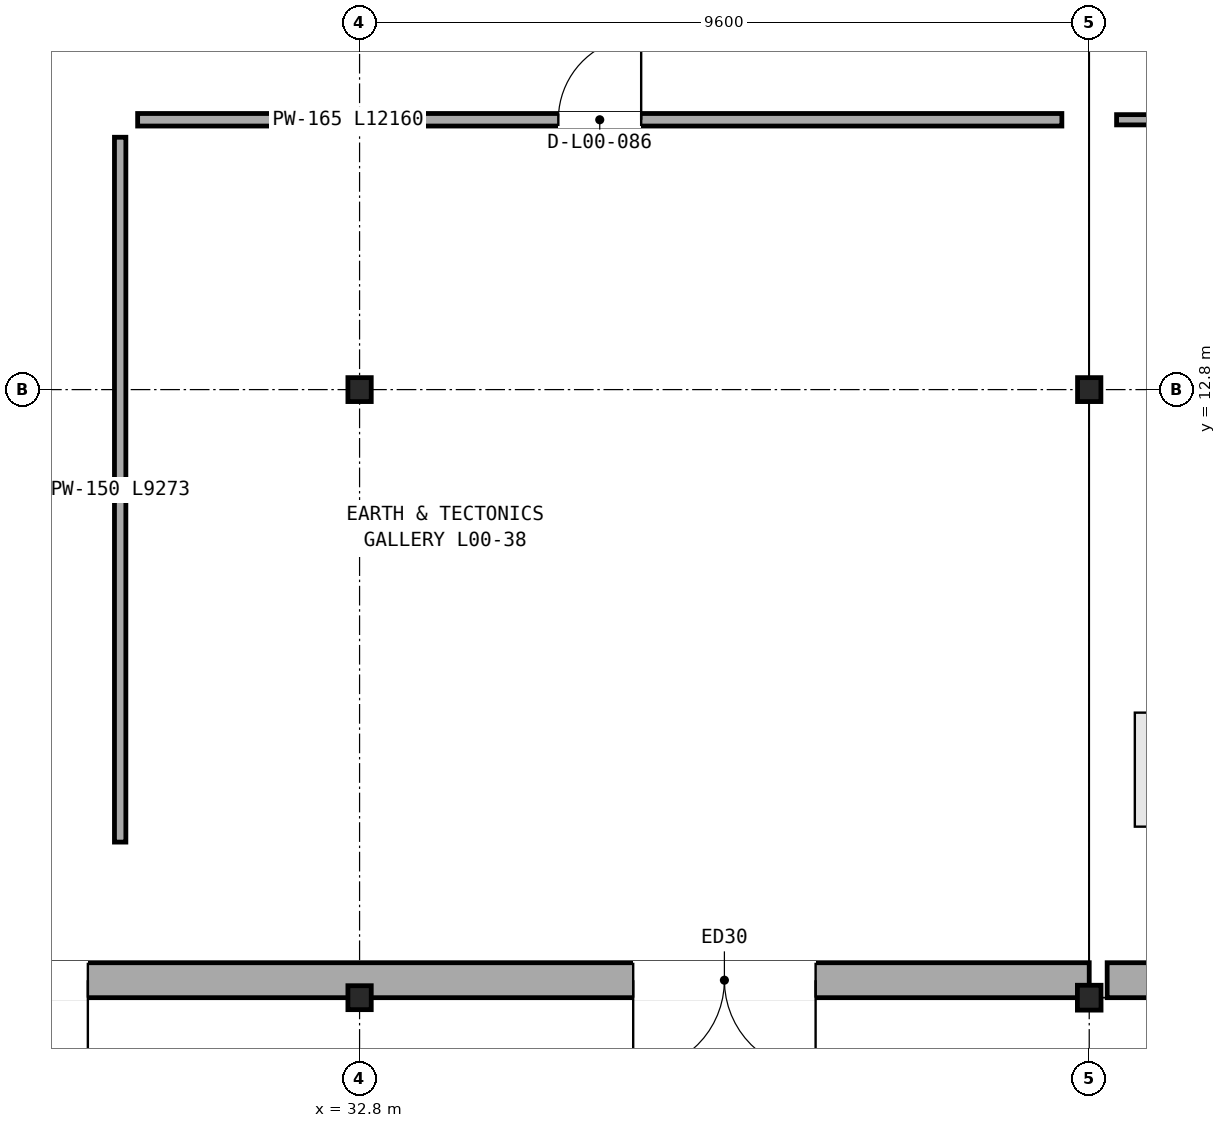
"""IFC4 building model, lengths in metres.
Left out: names, types, materials, properties, quantities, classifications, styles, units other than length and angle.
Written with IfcOpenShell. Run it as: python <this file> out.ifc"""

import sys

from ifc_helpers import new_model, si_unit, direction, frame, frame_2d, origin, origin_2d, place, context, subcontext, project, spatial, rectangle, i_section, extrude, element, fill, save


model = new_model("IFC4")
c1 = context("Model", 3, precision=1e-05, world=origin(), true_north=direction((0.0, 1.0)))
c2 = subcontext(c1, "Body", "Model", "MODEL_VIEW")
j1 = project(units=[si_unit("LENGTHUNIT", "METRE"), si_unit("PLANEANGLEUNIT", "RADIAN")], contexts=[c1])
p1 = place(None, origin())
s1 = spatial("IfcSite", under=j1, at=p1, CompositionType="ELEMENT")
p2 = place(p1, origin())
s2 = spatial("IfcBuilding", under=s1, at=p2, CompositionType="ELEMENT")
p3 = place(p2, origin())
s3 = spatial("IfcBuildingStorey", under=s2, at=p3, CompositionType="ELEMENT", Elevation=0.0)
for number, where, z_axis, x_axis in (
    (1, (32.8, 4.8, 0.0), (0.0, 0.0, 1.0), (1.0, 0.0, 0.0)),
    (2, (32.8, 12.8, 0.0), (0.0, 0.0, 1.0), (1.0, 0.0, 0.0)),
):
    element("IfcColumn", number, at=place(p3, frame(where, z_axis=z_axis, x_axis=x_axis)), inside=s3, PredefinedType="COLUMN", context=c2, shape_type="SweptSolid", body=[
        extrude(i_section(OverallWidth=0.307, OverallDepth=0.315, WebThickness=0.012, FlangeThickness=0.019, FilletRadius=0.017, at=origin_2d()), origin(), (0.0, 0.0, 1.0), 5.6),
    ])
p4 = place(p3, frame((42.4, 4.8, 0.0), z_axis=(0.0, 0.0, 1.0), x_axis=(1.0, 0.0, 0.0)))
e3 = element("IfcColumn", 3, at=p4, inside=s3, PredefinedType="COLUMN", context=c2, shape_type="SweptSolid", body=[
    extrude(i_section(OverallWidth=0.311, OverallDepth=0.327, WebThickness=0.016, FlangeThickness=0.025, FilletRadius=0.017, at=origin_2d()), origin(), (0.0, 0.0, 1.0), 5.6),
])
p5 = place(p3, frame((42.4, 12.8, 0.0), z_axis=(0.0, 0.0, 1.0), x_axis=(1.0, 0.0, 0.0)))
e4 = element("IfcColumn", 4, at=p5, inside=s3, PredefinedType="COLUMN", context=c2, shape_type="SweptSolid", body=[
    extrude(i_section(OverallWidth=0.307, OverallDepth=0.315, WebThickness=0.012, FlangeThickness=0.019, FilletRadius=0.017, at=origin_2d()), origin(), (0.0, 0.0, 1.0), 5.6),
])
p6 = place(p3, frame((5.036, 5.03, 0.0), z_axis=(0.0, 0.0, 1.0), x_axis=(1.0, 0.0, 0.0)))
e5 = element("IfcWall", 5, at=p6, inside=s3, PredefinedType="SOLIDWALL", context=c2, shape_type="SweptSolid", body=[
    extrude(rectangle(XDim=37.364, YDim=0.46, at=frame_2d((18.682, 0.0))), origin(), (0.0, 0.0, 1.0), 4.802),
])
p7 = place(p6, frame((12.114, 0.0, 0.0)))
e6 = element("IfcOpeningElement", 6, at=p7, cuts=e5, PredefinedType="OPENING", context=c2, shape_type="SweptSolid", body=[
    extrude(rectangle(XDim=2.5, YDim=2.55, at=frame_2d((1.25, 1.275))), frame((0.0, 0.24, 0.0), z_axis=(0.0, -1.0, 0.0), x_axis=(1.0, 0.0, 0.0)), (0.0, 0.0, 1.0), 0.48),
])
p8 = place(p6, frame((21.739, 0.0, 0.0)))
e7 = element("IfcOpeningElement", 7, at=p8, cuts=e5, PredefinedType="OPENING", context=c2, shape_type="SweptSolid", body=[
    extrude(rectangle(XDim=2.45, YDim=2.5, at=frame_2d((1.225, 1.25))), frame((0.0, 0.24, 0.0), z_axis=(0.0, -1.0, 0.0), x_axis=(1.0, 0.0, 0.0)), (0.0, 0.0, 1.0), 0.48),
])
p9 = place(p6, frame((31.364, 0.0, 0.0)))
e8 = element("IfcOpeningElement", 8, at=p9, cuts=e5, PredefinedType="OPENING", context=c2, shape_type="SweptSolid", body=[
    extrude(rectangle(XDim=2.4, YDim=2.45, at=frame_2d((1.2, 1.225))), frame((0.0, 0.24, 0.0), z_axis=(0.0, -1.0, 0.0), x_axis=(1.0, 0.0, 0.0)), (0.0, 0.0, 1.0), 0.48),
])
p10 = place(p6, frame((1.8, 0.0, 0.9)))
e9 = element("IfcOpeningElement", 9, at=p10, cuts=e5, PredefinedType="OPENING", context=c2, shape_type="SweptSolid", body=[
    extrude(rectangle(XDim=1.85, YDim=1.85, at=frame_2d((0.925, 0.925))), frame((0.0, 0.24, 0.0), z_axis=(0.0, -1.0, 0.0), x_axis=(1.0, 0.0, 0.0)), (0.0, 0.0, 1.0), 0.48),
])
p11 = place(p3, frame((42.636, 5.03, 0.0), z_axis=(0.0, 0.0, 1.0), x_axis=(1.0, 0.0, 0.0)))
e10 = element("IfcWall", 10, at=p11, inside=s3, PredefinedType="SOLIDWALL", context=c2, shape_type="SweptSolid", body=[
    extrude(rectangle(XDim=37.928, YDim=0.46, at=frame_2d((18.964, 0.0))), origin(), (0.0, 0.0, 1.0), 4.802),
])
p12 = place(p11, frame((29.614, 0.0, 0.0)))
e11 = element("IfcOpeningElement", 11, at=p12, cuts=e10, PredefinedType="OPENING", context=c2, shape_type="SweptSolid", body=[
    extrude(rectangle(XDim=2.4, YDim=2.45, at=frame_2d((1.2, 1.225))), frame((0.0, 0.24, 0.0), z_axis=(0.0, -1.0, 0.0), x_axis=(1.0, 0.0, 0.0)), (0.0, 0.0, 1.0), 0.48),
])
p13 = place(p11, frame((1.8, 0.0, 0.9)))
e12 = element("IfcOpeningElement", 12, at=p13, cuts=e10, PredefinedType="OPENING", context=c2, shape_type="SweptSolid", body=[
    extrude(rectangle(XDim=2.12, YDim=1.85, at=frame_2d((1.06, 0.925))), frame((0.0, 0.24, 0.0), z_axis=(0.0, -1.0, 0.0), x_axis=(1.0, 0.0, 0.0)), (0.0, 0.0, 1.0), 0.48),
])
p14 = place(p11, frame((6.4, 0.0, 0.9)))
e13 = element("IfcOpeningElement", 13, at=p14, cuts=e10, PredefinedType="OPENING", context=c2, shape_type="SweptSolid", body=[
    extrude(rectangle(XDim=2.2, YDim=1.85, at=frame_2d((1.1, 0.925))), frame((0.0, 0.24, 0.0), z_axis=(0.0, -1.0, 0.0), x_axis=(1.0, 0.0, 0.0)), (0.0, 0.0, 1.0), 0.48),
])
p15 = place(p11, frame((11.0, 0.0, 0.9)))
e14 = element("IfcOpeningElement", 14, at=p15, cuts=e10, PredefinedType="OPENING", context=c2, shape_type="SweptSolid", body=[
    extrude(rectangle(XDim=2.4, YDim=1.85, at=frame_2d((1.2, 0.925))), frame((0.0, 0.24, 0.0), z_axis=(0.0, -1.0, 0.0), x_axis=(1.0, 0.0, 0.0)), (0.0, 0.0, 1.0), 0.48),
])
p16 = place(p11, frame((15.6, 0.0, 0.9)))
e15 = element("IfcOpeningElement", 15, at=p16, cuts=e10, PredefinedType="OPENING", context=c2, shape_type="SweptSolid", body=[
    extrude(rectangle(XDim=2.65, YDim=1.85, at=frame_2d((1.325, 0.925))), frame((0.0, 0.24, 0.0), z_axis=(0.0, -1.0, 0.0), x_axis=(1.0, 0.0, 0.0)), (0.0, 0.0, 1.0), 0.48),
])
p17 = place(p11, frame((20.2, 0.0, 0.9)))
e16 = element("IfcOpeningElement", 16, at=p17, cuts=e10, PredefinedType="OPENING", context=c2, shape_type="SweptSolid", body=[
    extrude(rectangle(XDim=0.95, YDim=2.15, at=frame_2d((0.475, 1.075))), frame((0.0, 0.24, 0.0), z_axis=(0.0, -1.0, 0.0), x_axis=(1.0, 0.0, 0.0)), (0.0, 0.0, 1.0), 0.48),
])
p18 = place(p11, frame((24.8, 0.0, 0.9)))
e17 = element("IfcOpeningElement", 17, at=p18, cuts=e10, PredefinedType="OPENING", context=c2, shape_type="SweptSolid", body=[
    extrude(rectangle(XDim=1.1, YDim=2.15, at=frame_2d((0.55, 1.075))), frame((0.0, 0.24, 0.0), z_axis=(0.0, -1.0, 0.0), x_axis=(1.0, 0.0, 0.0)), (0.0, 0.0, 1.0), 0.48),
])
p19 = place(p3, frame((42.76, 16.35, 0.0), z_axis=(0.0, 0.0, 1.0), x_axis=(1.0, 0.0, 0.0)))
e18 = element("IfcWall", 18, at=p19, inside=s3, PredefinedType="PARTITIONING", context=c2, shape_type="SweptSolid", body=[
    extrude(rectangle(XDim=19.17, YDim=0.135, at=frame_2d((9.585, 0.0))), origin(), (0.0, 0.0, 1.0), 5.23),
])
p20 = place(p3, frame((29.88, 16.35, 0.0), z_axis=(0.0, 0.0, 1.0), x_axis=(1.0, 0.0, 0.0)))
e19 = element("IfcWall", 19, at=p20, inside=s3, PredefinedType="PARTITIONING", context=c2, shape_type="SweptSolid", body=[
    extrude(rectangle(XDim=12.16, YDim=0.165, at=frame_2d((6.08, 0.0))), origin(), (0.0, 0.0, 1.0), 4.717),
])
p21 = place(p20, frame((5.535, 0.0, 0.0)))
e20 = element("IfcOpeningElement", 20, at=p21, cuts=e19, PredefinedType="OPENING", context=c2, shape_type="SweptSolid", body=[
    extrude(rectangle(XDim=1.09, YDim=2.16, at=frame_2d((0.545, 1.08))), frame((0.0, 0.093, 0.0), z_axis=(0.0, -1.0, 0.0), x_axis=(1.0, 0.0, 0.0)), (0.0, 0.0, 1.0), 0.185),
])
p22 = place(p3, frame((29.65, 6.847, 0.0), z_axis=(0.0, 0.0, 1.0), x_axis=(0.0, 1.0, 0.0)))
e21 = element("IfcWall", 21, at=p22, inside=s3, PredefinedType="PARTITIONING", context=c2, shape_type="SweptSolid", body=[
    extrude(rectangle(XDim=9.273, YDim=0.15, at=frame_2d((4.637, 0.0))), origin(), (0.0, 0.0, 1.0), 4.638),
])
p23 = place(p8, frame((2.45, 0.0, 0.0), z_axis=(0.0, 0.0, 1.0), x_axis=(-1.0, 0.0, 0.0)))
e22 = element("IfcDoor", 22, at=p23, inside=s3, OperationType="DOUBLE_DOOR_SINGLE_SWING", PredefinedType="DOOR", context=c2, shape_type="SweptSolid", body=[
    extrude(rectangle(XDim=2.45, YDim=2.5, at=frame_2d((1.225, 1.25))), frame((0.0, 0.025, 0.0), z_axis=(0.0, -1.0, 0.0), x_axis=(1.0, 0.0, 0.0)), (0.0, 0.0, 1.0), 0.05),
])
fill(e7, e22)
p24 = place(p9, frame((2.4, 0.0, 0.0), z_axis=(0.0, 0.0, 1.0), x_axis=(-1.0, 0.0, 0.0)))
e23 = element("IfcDoor", 23, at=p24, inside=s3, OperationType="DOUBLE_DOOR_SINGLE_SWING", PredefinedType="DOOR", context=c2, shape_type="SweptSolid", body=[
    extrude(rectangle(XDim=2.4, YDim=2.45, at=frame_2d((1.2, 1.225))), frame((0.0, 0.025, 0.0), z_axis=(0.0, -1.0, 0.0), x_axis=(1.0, 0.0, 0.0)), (0.0, 0.0, 1.0), 0.05),
])
fill(e8, e23)
p25 = place(p21, origin())
e24 = element("IfcDoor", 24, at=p25, inside=s3, OperationType="SINGLE_SWING_RIGHT", PredefinedType="DOOR", context=c2, shape_type="SweptSolid", body=[
    extrude(rectangle(XDim=1.09, YDim=2.16, at=frame_2d((0.545, 1.08))), frame((0.0, 0.025, 0.0), z_axis=(0.0, -1.0, 0.0), x_axis=(1.0, 0.0, 0.0)), (0.0, 0.0, 1.0), 0.05),
])
fill(e20, e24)
save(model, sys.argv[1])
